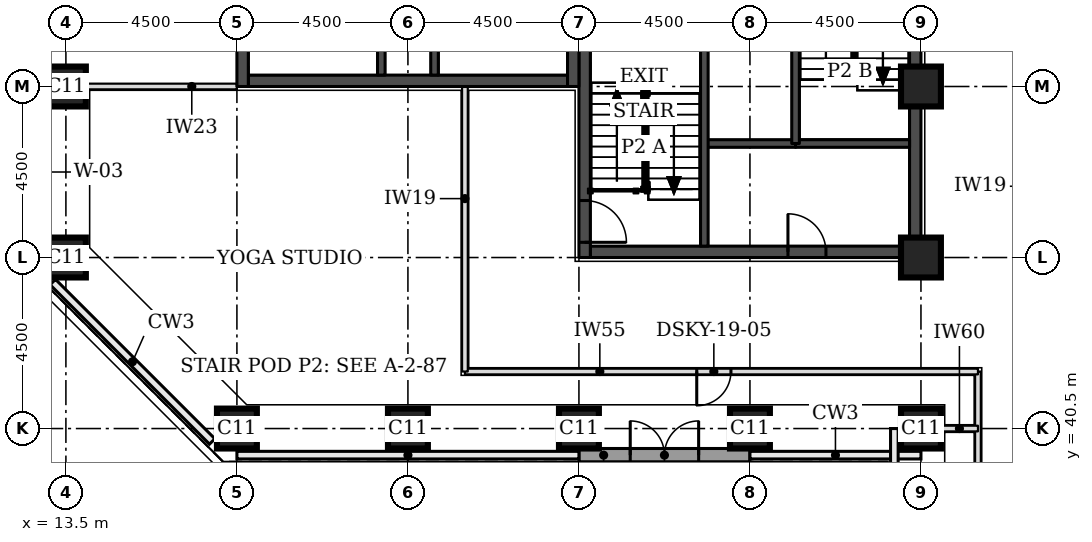
"""IFC4 building model, lengths in metres.
Left out: names, types, materials, properties, quantities, classifications, styles, units other than length and angle.
Written with IfcOpenShell. Run it as: python <this file> out.ifc"""

import sys

from ifc_helpers import new_model, si_unit, direction, frame, frame_2d, origin, origin_2d, place, context, subcontext, project, spatial, rectangle, extrude, element, fill, save


model = new_model("IFC4")
c1 = context("Model", 3, precision=1e-05, world=origin(), true_north=direction((0.0, 1.0)))
c2 = subcontext(c1, "Body", "Model", "MODEL_VIEW")
j1 = project(units=[si_unit("LENGTHUNIT", "METRE"), si_unit("PLANEANGLEUNIT", "RADIAN")], contexts=[c1])
p1 = place(None, origin())
s1 = spatial("IfcSite", under=j1, at=p1, CompositionType="ELEMENT")
p2 = place(p1, origin())
s2 = spatial("IfcBuilding", under=s1, at=p2, CompositionType="ELEMENT")
p3 = place(p2, frame((0.0, 0.0, 74.3)))
s3 = spatial("IfcBuildingStorey", under=s2, at=p3, CompositionType="ELEMENT", Elevation=74.3)
for number, where, z_axis, x_axis in (
    (1, (18.0, 40.5, 0.0), (0.0, 0.0, 1.0), (1.0, 0.0, 0.0)),
    (2, (22.5, 40.5, 0.0), (0.0, 0.0, 1.0), (1.0, 0.0, 0.0)),
    (3, (27.0, 40.5, 0.0), (0.0, 0.0, 1.0), (1.0, 0.0, 0.0)),
    (4, (31.5, 40.5, 0.0), (0.0, 0.0, 1.0), (1.0, 0.0, 0.0)),
    (5, (36.0, 40.5, 0.0), (0.0, 0.0, 1.0), (1.0, 0.0, 0.0)),
    (6, (13.5, 45.0, 0.0), (0.0, 0.0, 1.0), (1.0, 0.0, 0.0)),
    (7, (36.0, 45.0, 0.0), (0.0, 0.0, 1.0), (1.0, 0.0, 0.0)),
    (8, (13.5, 49.5, 0.0), (0.0, 0.0, 1.0), (1.0, 0.0, 0.0)),
    (9, (36.0, 49.5, 0.0), (0.0, 0.0, 1.0), (1.0, 0.0, 0.0)),
):
    element("IfcColumn", number, at=place(p3, frame(where, z_axis=z_axis, x_axis=x_axis)), inside=s3, PredefinedType="COLUMN", context=c2, shape_type="SweptSolid", body=[
        extrude(rectangle(XDim=1.05, YDim=1.05, at=origin_2d()), origin(), (0.0, 0.0, 1.0), 4.6),
    ])
p4 = place(p3, frame((27.3, 45.15, 0.0), z_axis=(0.0, 0.0, 1.0), x_axis=(1.0, 0.0, 0.0)))
e10 = element("IfcWall", 10, at=p4, inside=s3, PredefinedType="SHEAR", context=c2, shape_type="SweptSolid", body=[
    extrude(rectangle(XDim=8.4, YDim=0.3, at=frame_2d((4.2, 0.0))), origin(), (0.0, 0.0, 1.0), 4.6),
])
p5 = place(p4, frame((5.2, 0.0, 0.0)))
e11 = element("IfcOpeningElement", 11, at=p5, cuts=e10, PredefinedType="OPENING", context=c2, shape_type="SweptSolid", body=[
    extrude(rectangle(XDim=1.0, YDim=2.1, at=frame_2d((0.5, 1.05))), frame((0.0, 0.16, 0.0), z_axis=(0.0, -1.0, 0.0), x_axis=(1.0, 0.0, 0.0)), (0.0, 0.0, 1.0), 0.32),
])
p6 = place(p3, frame((27.15, 45.0, 0.0), z_axis=(0.0, 0.0, 1.0), x_axis=(0.0, 1.0, 0.0)))
e12 = element("IfcWall", 12, at=p6, inside=s3, PredefinedType="SHEAR", context=c2, shape_type="SweptSolid", body=[
    extrude(rectangle(XDim=9.0, YDim=0.3, at=frame_2d((4.5, 0.0))), origin(), (0.0, 0.0, 1.0), 4.6),
])
p7 = place(p6, frame((0.4, 0.0, 0.0)))
e13 = element("IfcOpeningElement", 13, at=p7, cuts=e12, PredefinedType="OPENING", context=c2, shape_type="SweptSolid", body=[
    extrude(rectangle(XDim=1.1, YDim=2.1, at=frame_2d((0.55, 1.05))), frame((0.0, 0.16, 0.0), z_axis=(0.0, -1.0, 0.0), x_axis=(1.0, 0.0, 0.0)), (0.0, 0.0, 1.0), 0.32),
])
p8 = place(p3, frame((35.85, 45.0, 0.0), z_axis=(0.0, 0.0, 1.0), x_axis=(0.0, 1.0, 0.0)))
e14 = element("IfcWall", 14, at=p8, inside=s3, PredefinedType="SHEAR", context=c2, shape_type="SweptSolid", body=[
    extrude(rectangle(XDim=9.0, YDim=0.3, at=frame_2d((4.5, 0.0))), origin(), (0.0, 0.0, 1.0), 4.6),
])
p9 = place(p3, frame((18.3, 49.65, 0.0), z_axis=(0.0, 0.0, 1.0), x_axis=(1.0, 0.0, 0.0)))
e15 = element("IfcWall", 15, at=p9, inside=s3, PredefinedType="SHEAR", context=c2, shape_type="SweptSolid", body=[
    extrude(rectangle(XDim=8.4, YDim=0.3, at=frame_2d((4.2, 0.0))), origin(), (0.0, 0.0, 1.0), 4.6),
])
p10 = place(p3, frame((18.15, 49.5, 0.0), z_axis=(0.0, 0.0, 1.0), x_axis=(0.0, 1.0, 0.0)))
e16 = element("IfcWall", 16, at=p10, inside=s3, PredefinedType="SHEAR", context=c2, shape_type="SweptSolid", body=[
    extrude(rectangle(XDim=9.0, YDim=0.3, at=frame_2d((4.5, 0.0))), origin(), (0.0, 0.0, 1.0), 4.6),
])
p11 = place(p3, frame((26.85, 49.5, 0.0), z_axis=(0.0, 0.0, 1.0), x_axis=(0.0, 1.0, 0.0)))
e17 = element("IfcWall", 17, at=p11, inside=s3, PredefinedType="SHEAR", context=c2, shape_type="SweptSolid", body=[
    extrude(rectangle(XDim=9.0, YDim=0.3, at=frame_2d((4.5, 0.0))), origin(), (0.0, 0.0, 1.0), 4.6),
])
p12 = place(p11, frame((6.6, 0.0, 0.0)))
e18 = element("IfcOpeningElement", 18, at=p12, cuts=e17, PredefinedType="OPENING", context=c2, shape_type="SweptSolid", body=[
    extrude(rectangle(XDim=1.8, YDim=2.1, at=frame_2d((0.9, 1.05))), frame((0.0, 0.16, 0.0), z_axis=(0.0, -1.0, 0.0), x_axis=(1.0, 0.0, 0.0)), (0.0, 0.0, 1.0), 0.32),
])
p13 = place(p3, frame((27.0, 39.8, 0.0), z_axis=(0.0, 0.0, 1.0), x_axis=(1.0, 0.0, 0.0)))
e19 = element("IfcWall", 19, at=p13, inside=s3, PredefinedType="STANDARD", context=c2, shape_type="SweptSolid", body=[
    extrude(rectangle(XDim=4.5, YDim=0.35, at=frame_2d((2.25, 0.0))), origin(), (0.0, 0.0, 1.0), 4.425),
])
p14 = place(p13, frame((1.35, 0.0, 0.0)))
e20 = element("IfcOpeningElement", 20, at=p14, cuts=e19, PredefinedType="OPENING", context=c2, shape_type="SweptSolid", body=[
    extrude(rectangle(XDim=1.8, YDim=2.4, at=frame_2d((0.9, 1.2))), frame((0.0, 0.185, 0.0), z_axis=(0.0, -1.0, 0.0), x_axis=(1.0, 0.0, 0.0)), (0.0, 0.0, 1.0), 0.37),
])
p15 = place(p3, frame((37.5, 28.5, 0.0), z_axis=(0.0, 0.0, 1.0), x_axis=(0.0, 1.0, 0.0)))
e21 = element("IfcWall", 21, at=p15, inside=s3, PredefinedType="PARTITIONING", context=c2, shape_type="SweptSolid", body=[
    extrude(rectangle(XDim=13.5, YDim=0.15, at=frame_2d((6.75, 0.0))), origin(), (0.0, 0.0, 1.0), 4.45),
])
p16 = place(p15, frame((5.55, 0.0, 0.0)))
e22 = element("IfcOpeningElement", 22, at=p16, cuts=e21, PredefinedType="OPENING", context=c2, shape_type="SweptSolid", body=[
    extrude(rectangle(XDim=0.9, YDim=2.1, at=frame_2d((0.45, 1.05))), frame((0.0, 0.085, 0.0), z_axis=(0.0, -1.0, 0.0), x_axis=(1.0, 0.0, 0.0)), (0.0, 0.0, 1.0), 0.17),
])
p17 = place(p3, frame((24.0, 42.0, 0.0), z_axis=(0.0, 0.0, 1.0), x_axis=(1.0, 0.0, 0.0)))
e23 = element("IfcWall", 23, at=p17, inside=s3, PredefinedType="PARTITIONING", context=c2, shape_type="SweptSolid", body=[
    extrude(rectangle(XDim=13.5, YDim=0.15, at=frame_2d((6.75, 0.0))), origin(), (0.0, 0.0, 1.0), 3.922),
])
p18 = place(p17, frame((6.1, 0.0, 0.0)))
e24 = element("IfcOpeningElement", 24, at=p18, cuts=e23, PredefinedType="OPENING", context=c2, shape_type="SweptSolid", body=[
    extrude(rectangle(XDim=0.9, YDim=2.1, at=frame_2d((0.45, 1.05))), frame((0.0, 0.085, 0.0), z_axis=(0.0, -1.0, 0.0), x_axis=(1.0, 0.0, 0.0)), (0.0, 0.0, 1.0), 0.17),
])
p19 = place(p3, frame((24.0, 42.0, 0.0), z_axis=(0.0, 0.0, 1.0), x_axis=(0.0, 1.0, 0.0)))
e25 = element("IfcWall", 25, at=p19, inside=s3, PredefinedType="PARTITIONING", context=c2, shape_type="SweptSolid", body=[
    extrude(rectangle(XDim=7.5, YDim=0.15, at=frame_2d((3.75, 0.0))), origin(), (0.0, 0.0, 1.0), 4.45),
])
p20 = place(p3, frame((36.525, 40.5, 0.0), z_axis=(0.0, 0.0, 1.0), x_axis=(1.0, 0.0, 0.0)))
e26 = element("IfcWall", 26, at=p20, inside=s3, PredefinedType="PARTITIONING", context=c2, shape_type="SweptSolid", body=[
    extrude(rectangle(XDim=0.975, YDim=0.15, at=frame_2d((0.488, 0.0))), origin(), (0.0, 0.0, 1.0), 3.7),
])
p21 = place(p3, frame((14.025, 49.5, 0.0), z_axis=(0.0, 0.0, 1.0), x_axis=(1.0, 0.0, 0.0)))
e27 = element("IfcWall", 27, at=p21, inside=s3, PredefinedType="PARTITIONING", context=c2, shape_type="SweptSolid", body=[
    extrude(rectangle(XDim=3.975, YDim=0.15, at=frame_2d((1.988, 0.0))), origin(), (0.0, 0.0, 1.0), 4.45),
])
p22 = place(p3, frame((30.3, 48.0, 0.0), z_axis=(0.0, 0.0, 1.0), x_axis=(1.0, 0.0, 0.0)))
e28 = element("IfcWall", 28, at=p22, inside=s3, PredefinedType="SOLIDWALL", context=c2, shape_type="SweptSolid", body=[
    extrude(rectangle(XDim=2.4, YDim=0.2, at=frame_2d((1.2, 0.0))), origin(), (0.0, 0.0, 1.0), 4.45),
])
p23 = place(p3, frame((32.7, 48.0, 0.0), z_axis=(0.0, 0.0, 1.0), x_axis=(1.0, 0.0, 0.0)))
e29 = element("IfcWall", 29, at=p23, inside=s3, PredefinedType="SOLIDWALL", context=c2, shape_type="SweptSolid", body=[
    extrude(rectangle(XDim=3.0, YDim=0.2, at=frame_2d((1.5, 0.0))), origin(), (0.0, 0.0, 1.0), 4.45),
])
for number, where, z_axis, x_axis in (
    (30, (30.3, 45.3, 0.0), (0.0, 0.0, 1.0), (0.0, 1.0, 0.0)),
    (31, (32.7, 48.0, 0.0), (0.0, 0.0, 1.0), (0.0, 1.0, 0.0)),
):
    element("IfcWall", number, at=place(p3, frame(where, z_axis=z_axis, x_axis=x_axis)), inside=s3, PredefinedType="SOLIDWALL", context=c2, shape_type="SweptSolid", body=[
        extrude(rectangle(XDim=5.7, YDim=0.2, at=frame_2d((2.85, 0.0))), origin(), (0.0, 0.0, 1.0), 4.45),
    ])
for number, where, z_axis, x_axis in (
    (32, (21.8, 49.8, 0.0), (0.0, 0.0, 1.0), (0.0, 1.0, 0.0)),
    (33, (23.2, 49.8, 0.0), (0.0, 0.0, 1.0), (0.0, 1.0, 0.0)),
):
    element("IfcWall", number, at=place(p3, frame(where, z_axis=z_axis, x_axis=x_axis)), inside=s3, PredefinedType="SOLIDWALL", context=c2, shape_type="SweptSolid", body=[
        extrude(rectangle(XDim=6.05, YDim=0.2, at=frame_2d((3.025, 0.0))), origin(), (0.0, 0.0, 1.0), 4.45),
    ])
p24 = place(p14, origin())
e34 = element("IfcDoor", 34, at=p24, inside=s3, OperationType="DOUBLE_DOOR_SINGLE_SWING", PredefinedType="DOOR", context=c2, shape_type="SweptSolid", body=[
    extrude(rectangle(XDim=1.8, YDim=2.4, at=frame_2d((0.9, 1.2))), frame((0.0, 0.08, 0.0), z_axis=(0.0, -1.0, 0.0), x_axis=(1.0, 0.0, 0.0)), (0.0, 0.0, 1.0), 0.05),
])
fill(e20, e34)
p25 = place(p18, frame((0.9, 0.0, 0.0), z_axis=(0.0, 0.0, 1.0), x_axis=(-1.0, 0.0, 0.0)))
e35 = element("IfcDoor", 35, at=p25, inside=s3, OperationType="SINGLE_SWING_RIGHT", PredefinedType="DOOR", context=c2, shape_type="SweptSolid", body=[
    extrude(rectangle(XDim=0.9, YDim=2.1, at=frame_2d((0.45, 1.05))), frame((0.0, 0.025, 0.0), z_axis=(0.0, -1.0, 0.0), x_axis=(1.0, 0.0, 0.0)), (0.0, 0.0, 1.0), 0.05),
])
fill(e24, e35)
p26 = place(p7, frame((1.1, 0.0, 0.0), z_axis=(0.0, 0.0, 1.0), x_axis=(-1.0, 0.0, 0.0)))
e36 = element("IfcDoor", 36, at=p26, inside=s3, OperationType="SINGLE_SWING_RIGHT", PredefinedType="DOOR", context=c2, shape_type="SweptSolid", body=[
    extrude(rectangle(XDim=1.1, YDim=2.1, at=frame_2d((0.55, 1.05))), frame((0.0, 0.025, 0.0), z_axis=(0.0, -1.0, 0.0), x_axis=(1.0, 0.0, 0.0)), (0.0, 0.0, 1.0), 0.05),
])
fill(e13, e36)
p27 = place(p5, origin())
e37 = element("IfcDoor", 37, at=p27, inside=s3, OperationType="SINGLE_SWING_LEFT", PredefinedType="DOOR", context=c2, shape_type="SweptSolid", body=[
    extrude(rectangle(XDim=1.0, YDim=2.1, at=frame_2d((0.5, 1.05))), frame((0.0, 0.025, 0.0), z_axis=(0.0, -1.0, 0.0), x_axis=(1.0, 0.0, 0.0)), (0.0, 0.0, 1.0), 0.05),
])
fill(e11, e37)
save(model, sys.argv[1])
